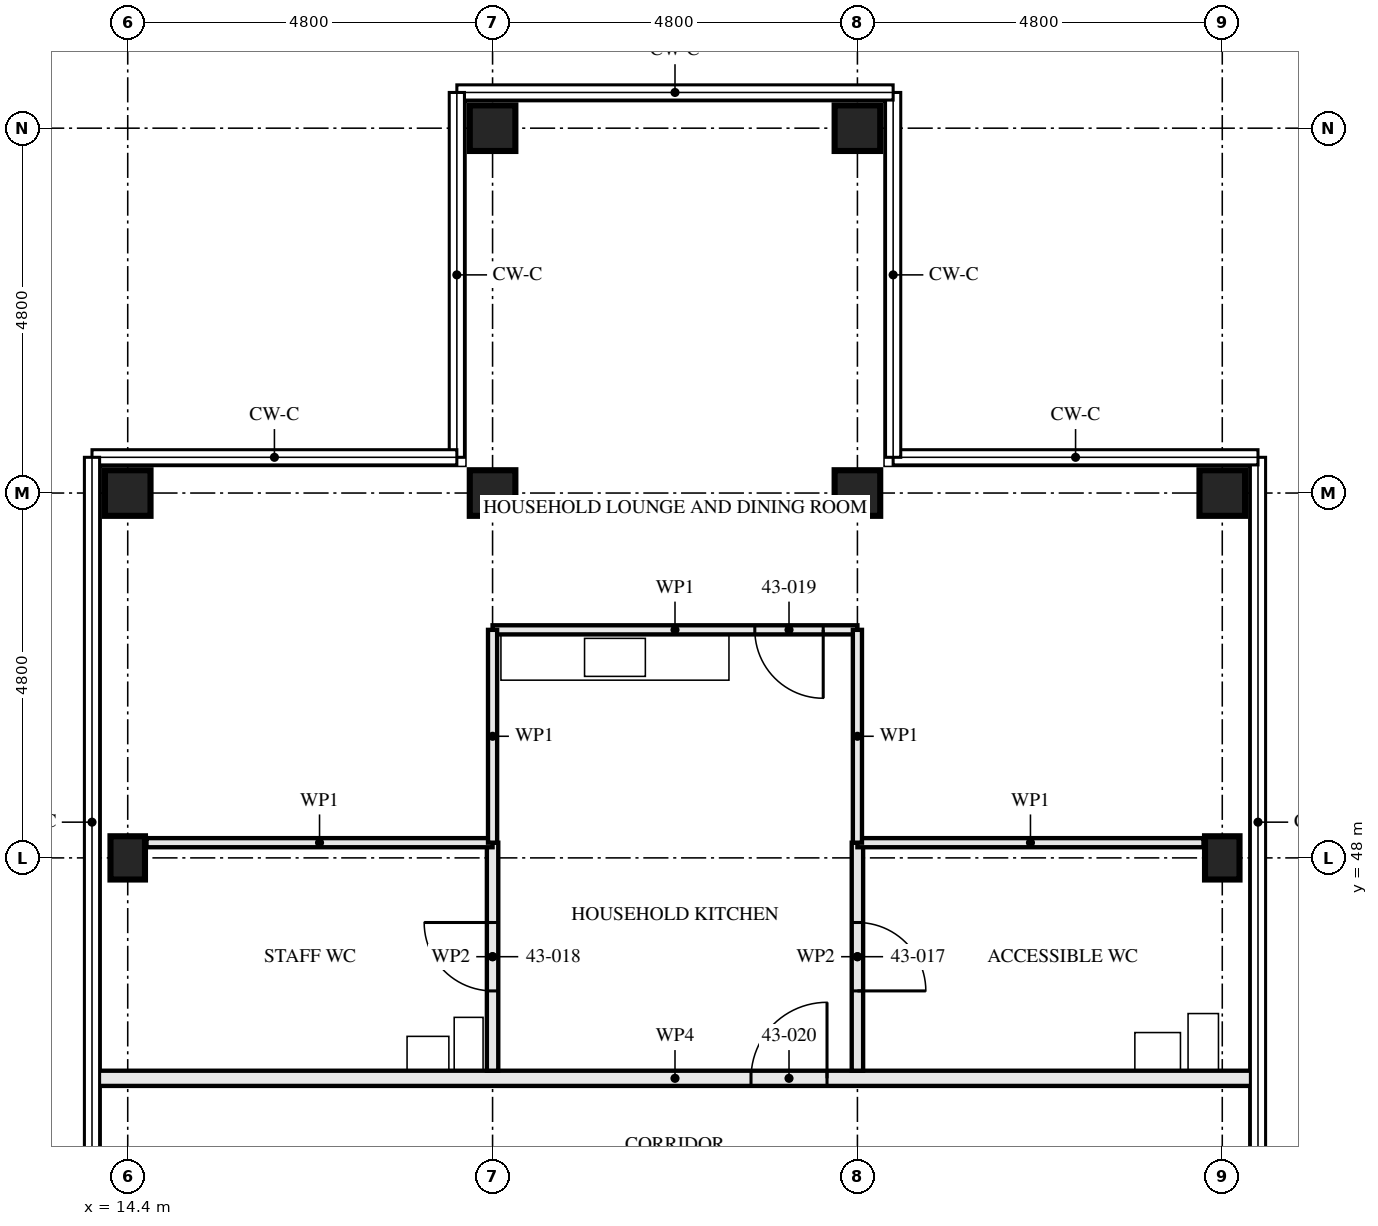
"""IFC4 building model, lengths in metres.
Left out: names, types, materials, properties, quantities, classifications, styles, units other than length and angle.
Written with IfcOpenShell. Run it as: python <this file> out.ifc"""

import sys

from ifc_helpers import new_model, si_unit, direction, frame, frame_2d, origin, origin_2d, place, context, subcontext, project, spatial, rectangle, hollow_rectangle, i_section, extrude, element, fill, save


model = new_model("IFC4")
c1 = context("Model", 3, precision=1e-05, world=origin(), true_north=direction((0.0, 1.0)))
c2 = subcontext(c1, "Body", "Model", "MODEL_VIEW")
j1 = project(units=[si_unit("LENGTHUNIT", "METRE"), si_unit("PLANEANGLEUNIT", "RADIAN")], contexts=[c1])
p1 = place(None, origin())
s1 = spatial("IfcSite", under=j1, at=p1, CompositionType="ELEMENT")
p2 = place(p1, origin())
s2 = spatial("IfcBuilding", under=s1, at=p2, CompositionType="ELEMENT")
p3 = place(p2, frame((0.0, 0.0, 158.5)))
s3 = spatial("IfcBuildingStorey", under=s2, at=p3, CompositionType="ELEMENT", Elevation=158.5)
p4 = place(p3, frame((14.4, 48.0, 0.0), z_axis=(0.0, 0.0, 1.0), x_axis=(1.0, 0.0, 0.0)))
e1 = element("IfcColumn", 1, at=p4, inside=s3, PredefinedType="COLUMN", context=c2, shape_type="SweptSolid", body=[
    extrude(i_section(OverallWidth=0.454, OverallDepth=0.569, WebThickness=0.078, FlangeThickness=0.125, FilletRadius=0.015, at=origin_2d()), origin(), (0.0, 0.0, 1.0), 3.5),
])
for number, where, z_axis, x_axis in (
    (2, (14.4, 52.8, 0.0), (0.0, 0.0, 1.0), (0.0, 1.0, 0.0)),
    (3, (19.2, 52.8, 0.0), (0.0, 0.0, 1.0), (0.0, 1.0, 0.0)),
    (4, (19.2, 57.6, 0.0), (0.0, 0.0, 1.0), (0.0, 1.0, 0.0)),
    (5, (24.0, 52.8, 0.0), (0.0, 0.0, 1.0), (0.0, 1.0, 0.0)),
    (6, (24.0, 57.6, 0.0), (0.0, 0.0, 1.0), (0.0, 1.0, 0.0)),
):
    element("IfcColumn", number, at=place(p3, frame(where, z_axis=z_axis, x_axis=x_axis)), inside=s3, PredefinedType="COLUMN", context=c2, shape_type="SweptSolid", body=[
        extrude(hollow_rectangle(XDim=0.6, YDim=0.6, WallThickness=0.05, at=origin_2d()), origin(), (0.0, 0.0, 1.0), 3.5),
    ])
p5 = place(p3, frame((28.8, 48.0, 0.0), z_axis=(0.0, 0.0, 1.0), x_axis=(1.0, 0.0, 0.0)))
e7 = element("IfcColumn", 7, at=p5, inside=s3, PredefinedType="COLUMN", context=c2, shape_type="SweptSolid", body=[
    extrude(i_section(OverallWidth=0.454, OverallDepth=0.569, WebThickness=0.078, FlangeThickness=0.125, FilletRadius=0.015, at=origin_2d()), origin(), (0.0, 0.0, 1.0), 3.5),
])
p6 = place(p3, frame((28.8, 52.8, 0.0), z_axis=(0.0, 0.0, 1.0), x_axis=(0.0, 1.0, 0.0)))
e8 = element("IfcColumn", 8, at=p6, inside=s3, PredefinedType="COLUMN", context=c2, shape_type="SweptSolid", body=[
    extrude(hollow_rectangle(XDim=0.6, YDim=0.6, WallThickness=0.05, at=origin_2d()), origin(), (0.0, 0.0, 1.0), 3.5),
])
p7 = place(p3, frame((24.0, 48.2, 0.0), z_axis=(0.0, 0.0, 1.0), x_axis=(0.0, -1.0, 0.0)))
e9 = element("IfcWall", 9, at=p7, inside=s3, PredefinedType="PARTITIONING", context=c2, shape_type="SweptSolid", body=[
    extrude(rectangle(XDim=3.0, YDim=0.15, at=frame_2d((1.5, 0.0))), origin(), (0.0, 0.0, 1.0), 2.55),
])
p8 = place(p7, frame((1.05, 0.0, 0.0)))
e10 = element("IfcOpeningElement", 10, at=p8, cuts=e9, PredefinedType="OPENING", context=c2, shape_type="SweptSolid", body=[
    extrude(rectangle(XDim=0.9, YDim=2.1, at=frame_2d((0.45, 1.05))), frame((0.0, 0.085, 0.0), z_axis=(0.0, -1.0, 0.0), x_axis=(1.0, 0.0, 0.0)), (0.0, 0.0, 1.0), 0.171),
])
p9 = place(p3, frame((19.2, 48.2, 0.0), z_axis=(0.0, 0.0, 1.0), x_axis=(0.0, -1.0, 0.0)))
e11 = element("IfcWall", 11, at=p9, inside=s3, PredefinedType="PARTITIONING", context=c2, shape_type="SweptSolid", body=[
    extrude(rectangle(XDim=3.0, YDim=0.15, at=frame_2d((1.5, 0.0))), origin(), (0.0, 0.0, 1.0), 2.55),
])
p10 = place(p9, frame((1.05, 0.0, 0.0)))
e12 = element("IfcOpeningElement", 12, at=p10, cuts=e11, PredefinedType="OPENING", context=c2, shape_type="SweptSolid", body=[
    extrude(rectangle(XDim=0.9, YDim=2.1, at=frame_2d((0.45, 1.05))), frame((0.0, 0.085, 0.0), z_axis=(0.0, -1.0, 0.0), x_axis=(1.0, 0.0, 0.0)), (0.0, 0.0, 1.0), 0.171),
])
p11 = place(p3, frame((28.553, 48.2, 0.0), z_axis=(0.0, 0.0, 1.0), x_axis=(-1.0, 0.0, 0.0)))
e13 = element("IfcWall", 13, at=p11, inside=s3, PredefinedType="PARTITIONING", context=c2, shape_type="SweptSolid", body=[
    extrude(rectangle(XDim=4.553, YDim=0.12, at=frame_2d((2.276, 0.0))), origin(), (0.0, 0.0, 1.0), 3.33),
])
p12 = place(p3, frame((24.0, 51.0, 0.0), z_axis=(0.0, 0.0, 1.0), x_axis=(-1.0, 0.0, 0.0)))
e14 = element("IfcWall", 14, at=p12, inside=s3, PredefinedType="PARTITIONING", context=c2, shape_type="SweptSolid", body=[
    extrude(rectangle(XDim=4.8, YDim=0.12, at=frame_2d((2.4, 0.0))), origin(), (0.0, 0.0, 1.0), 3.33),
])
p13 = place(p12, frame((0.45, 0.0, 0.0)))
e15 = element("IfcOpeningElement", 15, at=p13, cuts=e14, PredefinedType="OPENING", context=c2, shape_type="SweptSolid", body=[
    extrude(rectangle(XDim=0.9, YDim=2.1, at=frame_2d((0.45, 1.05))), frame((0.0, 0.071, 0.0), z_axis=(0.0, -1.0, 0.0), x_axis=(1.0, 0.0, 0.0)), (0.0, 0.0, 1.0), 0.141),
])
p14 = place(p3, frame((19.2, 48.2, 0.0), z_axis=(0.0, 0.0, 1.0), x_axis=(-1.0, 0.0, 0.0)))
e16 = element("IfcWall", 16, at=p14, inside=s3, PredefinedType="PARTITIONING", context=c2, shape_type="SweptSolid", body=[
    extrude(rectangle(XDim=4.553, YDim=0.12, at=frame_2d((2.276, 0.0))), origin(), (0.0, 0.0, 1.0), 3.33),
])
for number, where, z_axis, x_axis in (
    (17, (24.0, 51.0, 0.0), (0.0, 0.0, 1.0), (0.0, -1.0, 0.0)),
    (18, (19.2, 51.0, 0.0), (0.0, 0.0, 1.0), (0.0, -1.0, 0.0)),
):
    element("IfcWall", number, at=place(p3, frame(where, z_axis=z_axis, x_axis=x_axis)), inside=s3, PredefinedType="PARTITIONING", context=c2, shape_type="SweptSolid", body=[
        extrude(rectangle(XDim=2.8, YDim=0.12, at=frame_2d((1.4, 0.0))), origin(), (0.0, 0.0, 1.0), 3.33),
    ])
p15 = place(p3, frame((29.25, 45.1, 0.0), z_axis=(0.0, 0.0, 1.0), x_axis=(-1.0, 0.0, 0.0)))
e19 = element("IfcWall", 19, at=p15, inside=s3, PredefinedType="PARTITIONING", context=c2, shape_type="SweptSolid", body=[
    extrude(rectangle(XDim=15.3, YDim=0.2, at=frame_2d((7.65, 0.0))), origin(), (0.0, 0.0, 1.0), 2.32),
])
p16 = place(p15, frame((5.65, 0.0, 0.0)))
e20 = element("IfcOpeningElement", 20, at=p16, cuts=e19, PredefinedType="OPENING", context=c2, shape_type="SweptSolid", body=[
    extrude(rectangle(XDim=1.0, YDim=2.1, at=frame_2d((0.5, 1.05))), frame((0.0, 0.111, 0.0), z_axis=(0.0, -1.0, 0.0), x_axis=(1.0, 0.0, 0.0)), (0.0, 0.0, 1.0), 0.221),
])
p17 = place(p8, origin())
e21 = element("IfcDoor", 21, at=p17, inside=s3, OperationType="SINGLE_SWING_LEFT", PredefinedType="DOOR", context=c2, shape_type="SweptSolid", body=[
    extrude(rectangle(XDim=0.9, YDim=2.1, at=frame_2d((0.45, 1.05))), frame((0.0, 0.022, 0.0), z_axis=(0.0, -1.0, 0.0), x_axis=(1.0, 0.0, 0.0)), (0.0, 0.0, 1.0), 0.044),
])
fill(e10, e21)
p18 = place(p10, frame((0.9, 0.0, 0.0), z_axis=(0.0, 0.0, 1.0), x_axis=(-1.0, 0.0, 0.0)))
e22 = element("IfcDoor", 22, at=p18, inside=s3, OperationType="SINGLE_SWING_LEFT", PredefinedType="DOOR", context=c2, shape_type="SweptSolid", body=[
    extrude(rectangle(XDim=0.9, YDim=2.1, at=frame_2d((0.45, 1.05))), frame((0.0, 0.022, 0.0), z_axis=(0.0, -1.0, 0.0), x_axis=(1.0, 0.0, 0.0)), (0.0, 0.0, 1.0), 0.044),
])
fill(e12, e22)
p19 = place(p13, origin())
e23 = element("IfcDoor", 23, at=p19, inside=s3, OperationType="SINGLE_SWING_RIGHT", PredefinedType="DOOR", context=c2, shape_type="SweptSolid", body=[
    extrude(rectangle(XDim=0.9, YDim=2.1, at=frame_2d((0.45, 1.05))), frame((0.0, 0.022, 0.0), z_axis=(0.0, -1.0, 0.0), x_axis=(1.0, 0.0, 0.0)), (0.0, 0.0, 1.0), 0.044),
])
fill(e15, e23)
p20 = place(p16, frame((1.0, 0.0, 0.0), z_axis=(0.0, 0.0, 1.0), x_axis=(-1.0, 0.0, 0.0)))
e24 = element("IfcDoor", 24, at=p20, inside=s3, OperationType="SINGLE_SWING_LEFT", PredefinedType="DOOR", context=c2, shape_type="SweptSolid", body=[
    extrude(rectangle(XDim=1.0, YDim=2.1, at=frame_2d((0.5, 1.05))), frame((0.0, 0.027, 0.0), z_axis=(0.0, -1.0, 0.0), x_axis=(1.0, 0.0, 0.0)), (0.0, 0.0, 1.0), 0.054),
])
fill(e20, e24)
save(model, sys.argv[1])
